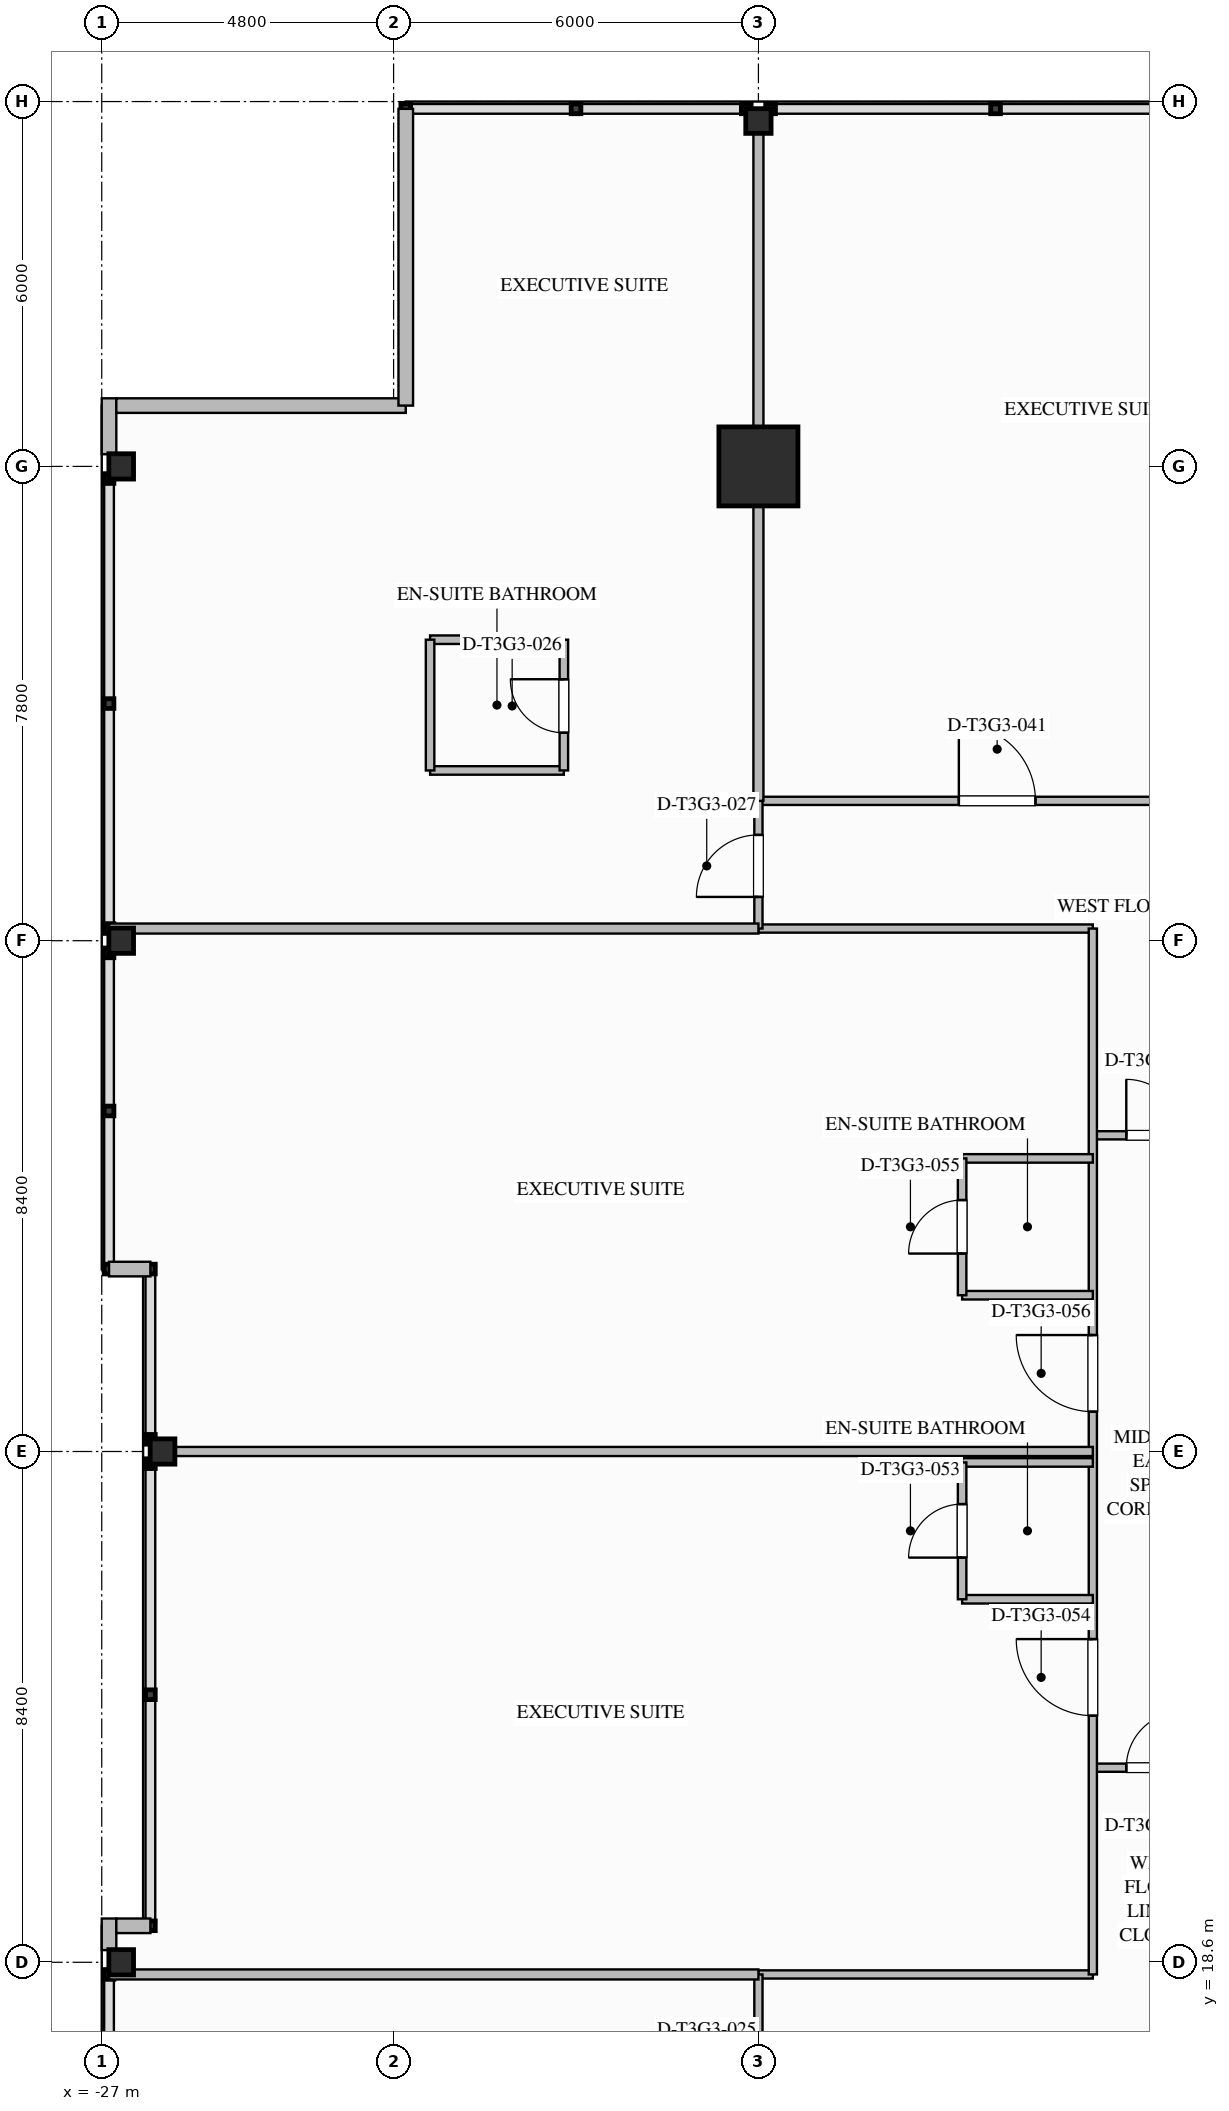
"""IFC4 building model, lengths in metres.
Left out: names, types, materials, properties, quantities, classifications, styles, units other than length and angle.
Written with IfcOpenShell. Run it as: python <this file> out.ifc"""

import sys

from ifc_helpers import new_model, si_unit, direction, frame, frame_2d, origin, origin_2d, place, context, subcontext, project, spatial, rectangle, i_section, extrude, element, fill, save


model = new_model("IFC4")
c1 = context("Model", 3, precision=1e-05, world=origin(), true_north=direction((0.0, 1.0)))
c2 = subcontext(c1, "Body", "Model", "MODEL_VIEW")
j1 = project(units=[si_unit("LENGTHUNIT", "METRE"), si_unit("PLANEANGLEUNIT", "RADIAN")], contexts=[c1])
p1 = place(None, origin())
s1 = spatial("IfcSite", under=j1, at=p1, CompositionType="ELEMENT")
p2 = place(p1, origin())
s2 = spatial("IfcBuilding", under=s1, at=p2, CompositionType="ELEMENT")
p3 = place(p2, frame((0.0, 0.0, 171.7)))
s3 = spatial("IfcBuildingStorey", under=s2, at=p3, CompositionType="ELEMENT", Elevation=171.7)
p4 = place(p3, frame((-16.2, 43.2, 0.0), z_axis=(0.0, 0.0, 1.0), x_axis=(1.0, 0.0, 0.0)))
e1 = element("IfcColumn", 1, at=p4, inside=s3, PredefinedType="COLUMN", context=c2, shape_type="SweptSolid", body=[
    extrude(rectangle(XDim=1.3, YDim=1.3, at=origin_2d()), origin(), (0.0, 0.0, 1.0), 3.55),
])
for number, where, z_axis, x_axis in (
    (2, (-26.68, 18.6, 0.0), (0.0, 0.0, 1.0), (1.0, 0.0, 0.0)),
    (3, (-26.0, 27.0, 0.0), (0.0, 0.0, 1.0), (1.0, 0.0, 0.0)),
    (4, (-26.68, 35.4, 0.0), (0.0, 0.0, 1.0), (1.0, 0.0, 0.0)),
    (5, (-26.68, 43.2, 0.0), (0.0, 0.0, 1.0), (1.0, 0.0, 0.0)),
    (6, (-16.2, 48.88, 0.0), (0.0, 0.0, 1.0), (0.0, 1.0, 0.0)),
):
    element("IfcColumn", number, at=place(p3, frame(where, z_axis=z_axis, x_axis=x_axis)), inside=s3, PredefinedType="COLUMN", context=c2, shape_type="SweptSolid", body=[
        extrude(i_section(OverallWidth=0.406, OverallDepth=0.416, WebThickness=0.03, FlangeThickness=0.048, FilletRadius=0.028, at=origin_2d()), origin(), (0.0, 0.0, 1.0), 3.547),
    ])
p5 = place(p3, frame((-26.88, 18.8, 0.0), z_axis=(0.0, 0.0, 1.0), x_axis=(0.0, 1.0, 0.0)))
e7 = element("IfcWall", 7, at=p5, inside=s3, PredefinedType="STANDARD", context=c2, shape_type="SweptSolid", body=[
    extrude(rectangle(XDim=0.52, YDim=0.24, at=frame_2d((0.26, 0.0))), origin(), (0.0, 0.0, 1.0), 3.29),
])
p6 = place(p3, frame((-26.88, 43.4, 0.0), z_axis=(0.0, 0.0, 1.0), x_axis=(0.0, 1.0, 0.0)))
e8 = element("IfcWall", 8, at=p6, inside=s3, PredefinedType="STANDARD", context=c2, shape_type="SweptSolid", body=[
    extrude(rectangle(XDim=0.92, YDim=0.24, at=frame_2d((0.46, 0.0))), origin(), (0.0, 0.0, 1.0), 3.29),
])
p7 = place(p3, frame((-26.76, 44.2, 0.0), z_axis=(0.0, 0.0, 1.0), x_axis=(1.0, 0.0, 0.0)))
e9 = element("IfcWall", 9, at=p7, inside=s3, PredefinedType="STANDARD", context=c2, shape_type="SweptSolid", body=[
    extrude(rectangle(XDim=4.76, YDim=0.24, at=frame_2d((2.38, 0.0))), origin(), (0.0, 0.0, 1.0), 3.29),
])
p8 = place(p3, frame((-22.0, 44.2, 0.0), z_axis=(0.0, 0.0, 1.0), x_axis=(0.0, 1.0, 0.0)))
e10 = element("IfcWall", 10, at=p8, inside=s3, PredefinedType="STANDARD", context=c2, shape_type="SweptSolid", body=[
    extrude(rectangle(XDim=4.88, YDim=0.24, at=frame_2d((2.44, 0.0))), origin(), (0.0, 0.0, 1.0), 3.29),
])
p9 = place(p3, frame((-26.76, 19.2, 0.0), z_axis=(0.0, 0.0, 1.0), x_axis=(1.0, 0.0, 0.0)))
e11 = element("IfcWall", 11, at=p9, inside=s3, PredefinedType="STANDARD", context=c2, shape_type="SweptSolid", body=[
    extrude(rectangle(XDim=0.56, YDim=0.24, at=frame_2d((0.28, 0.0))), origin(), (0.0, 0.0, 1.0), 3.29),
])
p10 = place(p3, frame((-26.2, 30.0, 0.0), z_axis=(0.0, 0.0, 1.0), x_axis=(-1.0, 0.0, 0.0)))
e12 = element("IfcWall", 12, at=p10, inside=s3, PredefinedType="STANDARD", context=c2, shape_type="SweptSolid", body=[
    extrude(rectangle(XDim=0.68, YDim=0.24, at=frame_2d((0.34, 0.0))), origin(), (0.0, 0.0, 1.0), 3.29),
])
p11 = place(p3, frame((-10.7, 21.8, 0.0), z_axis=(0.0, 0.0, 1.0), x_axis=(1.0, 0.0, 0.0)))
e13 = element("IfcWall", 13, at=p11, inside=s3, PredefinedType="PARTITIONING", context=c2, shape_type="SweptSolid", body=[
    extrude(rectangle(XDim=2.1, YDim=0.135, at=frame_2d((1.05, 0.0))), origin(), (0.0, 0.0, 1.0), 3.29),
])
p12 = place(p11, frame((0.55, 0.0, 0.0)))
e14 = element("IfcOpeningElement", 14, at=p12, cuts=e13, PredefinedType="OPENING", context=c2, shape_type="SweptSolid", body=[
    extrude(rectangle(XDim=0.92, YDim=2.1, at=frame_2d((0.46, 1.05))), frame((0.0, 0.077, 0.0), z_axis=(0.0, -1.0, 0.0), x_axis=(1.0, 0.0, 0.0)), (0.0, 0.0, 1.0), 0.155),
])
p13 = place(p3, frame((-10.7, 32.2, 0.0), z_axis=(0.0, 0.0, 1.0), x_axis=(1.0, 0.0, 0.0)))
e15 = element("IfcWall", 15, at=p13, inside=s3, PredefinedType="PARTITIONING", context=c2, shape_type="SweptSolid", body=[
    extrude(rectangle(XDim=2.1, YDim=0.135, at=frame_2d((1.05, 0.0))), origin(), (0.0, 0.0, 1.0), 3.29),
])
p14 = place(p13, frame((0.55, 0.0, 0.0)))
e16 = element("IfcOpeningElement", 16, at=p14, cuts=e15, PredefinedType="OPENING", context=c2, shape_type="SweptSolid", body=[
    extrude(rectangle(XDim=0.92, YDim=2.1, at=frame_2d((0.46, 1.05))), frame((0.0, 0.077, 0.0), z_axis=(0.0, -1.0, 0.0), x_axis=(1.0, 0.0, 0.0)), (0.0, 0.0, 1.0), 0.155),
])
for number, where, z_axis, x_axis in (
    (17, (-16.2, 18.4, 0.0), (0.0, 0.0, 1.0), (1.0, 0.0, 0.0)),
    (18, (-16.2, 35.6, 0.0), (0.0, 0.0, 1.0), (1.0, 0.0, 0.0)),
):
    element("IfcWall", number, at=place(p3, frame(where, z_axis=z_axis, x_axis=x_axis)), inside=s3, PredefinedType="PARTITIONING", context=c2, shape_type="SweptSolid", body=[
        extrude(rectangle(XDim=5.5, YDim=0.135, at=frame_2d((2.75, 0.0))), origin(), (0.0, 0.0, 1.0), 2.667),
    ])
p15 = place(p3, frame((-16.2, 37.7, 0.0), z_axis=(0.0, 0.0, 1.0), x_axis=(1.0, 0.0, 0.0)))
e19 = element("IfcWall", 19, at=p15, inside=s3, PredefinedType="PARTITIONING", context=c2, shape_type="SweptSolid", body=[
    extrude(rectangle(XDim=24.8, YDim=0.135, at=frame_2d((12.4, 0.0))), origin(), (0.0, 0.0, 1.0), 3.29),
])
p16 = place(p15, frame((3.296, 0.0, 0.0)))
e20 = element("IfcOpeningElement", 20, at=p16, cuts=e19, PredefinedType="OPENING", context=c2, shape_type="SweptSolid", body=[
    extrude(rectangle(XDim=1.26, YDim=2.2, at=frame_2d((0.63, 1.1))), frame((0.0, 0.077, 0.0), z_axis=(0.0, -1.0, 0.0), x_axis=(1.0, 0.0, 0.0)), (0.0, 0.0, 1.0), 0.155),
])
p17 = place(p15, frame((13.1, 0.0, 0.0)))
e21 = element("IfcOpeningElement", 21, at=p17, cuts=e19, PredefinedType="OPENING", context=c2, shape_type="SweptSolid", body=[
    extrude(rectangle(XDim=1.02, YDim=2.15, at=frame_2d((0.51, 1.075))), frame((0.0, 0.077, 0.0), z_axis=(0.0, -1.0, 0.0), x_axis=(1.0, 0.0, 0.0)), (0.0, 0.0, 1.0), 0.155),
])
p18 = place(p15, frame((19.023, 0.0, 0.0)))
e22 = element("IfcOpeningElement", 22, at=p18, cuts=e19, PredefinedType="OPENING", context=c2, shape_type="SweptSolid", body=[
    extrude(rectangle(XDim=1.26, YDim=2.2, at=frame_2d((0.63, 1.1))), frame((0.0, 0.077, 0.0), z_axis=(0.0, -1.0, 0.0), x_axis=(1.0, 0.0, 0.0)), (0.0, 0.0, 1.0), 0.155),
])
p19 = place(p3, frame((-10.7, 18.4, 0.0), z_axis=(0.0, 0.0, 1.0), x_axis=(0.0, 1.0, 0.0)))
e23 = element("IfcWall", 23, at=p19, inside=s3, PredefinedType="PARTITIONING", context=c2, shape_type="SweptSolid", body=[
    extrude(rectangle(XDim=17.2, YDim=0.135, at=frame_2d((8.6, 0.0))), origin(), (0.0, 0.0, 1.0), 3.29),
])
p20 = place(p19, frame((4.255, 0.0, 0.0)))
e24 = element("IfcOpeningElement", 24, at=p20, cuts=e23, PredefinedType="OPENING", context=c2, shape_type="SweptSolid", body=[
    extrude(rectangle(XDim=1.26, YDim=2.2, at=frame_2d((0.63, 1.1))), frame((0.0, 0.077, 0.0), z_axis=(0.0, -1.0, 0.0), x_axis=(1.0, 0.0, 0.0)), (0.0, 0.0, 1.0), 0.155),
])
p21 = place(p19, frame((9.255, 0.0, 0.0)))
e25 = element("IfcOpeningElement", 25, at=p21, cuts=e23, PredefinedType="OPENING", context=c2, shape_type="SweptSolid", body=[
    extrude(rectangle(XDim=1.26, YDim=2.2, at=frame_2d((0.63, 1.1))), frame((0.0, 0.077, 0.0), z_axis=(0.0, -1.0, 0.0), x_axis=(1.0, 0.0, 0.0)), (0.0, 0.0, 1.0), 0.155),
])
p22 = place(p3, frame((-16.2, 15.45, 0.0), z_axis=(0.0, 0.0, 1.0), x_axis=(0.0, 1.0, 0.0)))
e26 = element("IfcWall", 26, at=p22, inside=s3, PredefinedType="PARTITIONING", context=c2, shape_type="SweptSolid", body=[
    extrude(rectangle(XDim=2.95, YDim=0.135, at=frame_2d((1.475, 0.0))), origin(), (0.0, 0.0, 1.0), 2.58),
])
p23 = place(p22, frame((0.52, 0.0, 0.0)))
e27 = element("IfcOpeningElement", 27, at=p23, cuts=e26, PredefinedType="OPENING", context=c2, shape_type="SweptSolid", body=[
    extrude(rectangle(XDim=1.02, YDim=2.15, at=frame_2d((0.51, 1.075))), frame((0.0, 0.077, 0.0), z_axis=(0.0, -1.0, 0.0), x_axis=(1.0, 0.0, 0.0)), (0.0, 0.0, 1.0), 0.155),
])
p24 = place(p3, frame((-16.2, 35.6, 0.0), z_axis=(0.0, 0.0, 1.0), x_axis=(0.0, 1.0, 0.0)))
e28 = element("IfcWall", 28, at=p24, inside=s3, PredefinedType="PARTITIONING", context=c2, shape_type="SweptSolid", body=[
    extrude(rectangle(XDim=2.1, YDim=0.135, at=frame_2d((1.05, 0.0))), origin(), (0.0, 0.0, 1.0), 2.58),
])
p25 = place(p24, frame((0.52, 0.0, 0.0)))
e29 = element("IfcOpeningElement", 29, at=p25, cuts=e28, PredefinedType="OPENING", context=c2, shape_type="SweptSolid", body=[
    extrude(rectangle(XDim=1.02, YDim=2.15, at=frame_2d((0.51, 1.075))), frame((0.0, 0.077, 0.0), z_axis=(0.0, -1.0, 0.0), x_axis=(1.0, 0.0, 0.0)), (0.0, 0.0, 1.0), 0.155),
])
p26 = place(p3, frame((-16.2, 37.7, 0.0), z_axis=(0.0, 0.0, 1.0), x_axis=(0.0, 1.0, 0.0)))
e30 = element("IfcWall", 30, at=p26, inside=s3, PredefinedType="PARTITIONING", context=c2, shape_type="SweptSolid", body=[
    extrude(rectangle(XDim=11.38, YDim=0.165, at=frame_2d((5.69, 0.0))), origin(), (0.0, 0.0, 1.0), 2.58),
])
for number, where, z_axis, x_axis in (
    (31, (-26.88, 18.4, 0.0), (0.0, 0.0, 1.0), (1.0, 0.0, 0.0)),
    (32, (-26.88, 35.6, 0.0), (0.0, 0.0, 1.0), (1.0, 0.0, 0.0)),
):
    element("IfcWall", number, at=place(p3, frame(where, z_axis=z_axis, x_axis=x_axis)), inside=s3, PredefinedType="PARTITIONING", context=c2, shape_type="SweptSolid", body=[
        extrude(rectangle(XDim=10.68, YDim=0.165, at=frame_2d((5.34, 0.0))), origin(), (0.0, 0.0, 1.0), 2.58),
    ])
for number, where, z_axis, x_axis in (
    (33, (-21.6, 38.2, 0.0), (0.0, 0.0, 1.0), (1.0, 0.0, 0.0)),
    (34, (-21.6, 40.35, 0.0), (0.0, 0.0, 1.0), (1.0, 0.0, 0.0)),
):
    element("IfcWall", number, at=place(p3, frame(where, z_axis=z_axis, x_axis=x_axis)), inside=s3, PredefinedType="PLUMBINGWALL", context=c2, shape_type="SweptSolid", body=[
        extrude(rectangle(XDim=2.2, YDim=0.14, at=frame_2d((1.1, 0.0))), origin(), (0.0, 0.0, 1.0), 3.29),
    ])
p27 = place(p3, frame((-21.6, 38.2, 0.0), z_axis=(0.0, 0.0, 1.0), x_axis=(0.0, 1.0, 0.0)))
e35 = element("IfcWall", 35, at=p27, inside=s3, PredefinedType="PLUMBINGWALL", context=c2, shape_type="SweptSolid", body=[
    extrude(rectangle(XDim=2.15, YDim=0.14, at=frame_2d((1.075, 0.0))), origin(), (0.0, 0.0, 1.0), 3.29),
])
p28 = place(p3, frame((-19.4, 38.2, 0.0), z_axis=(0.0, 0.0, 1.0), x_axis=(0.0, 1.0, 0.0)))
e36 = element("IfcWall", 36, at=p28, inside=s3, PredefinedType="PLUMBINGWALL", context=c2, shape_type="SweptSolid", body=[
    extrude(rectangle(XDim=2.15, YDim=0.14, at=frame_2d((1.075, 0.0))), origin(), (0.0, 0.0, 1.0), 3.29),
])
p29 = place(p28, frame((0.62, 0.0, 0.0)))
e37 = element("IfcOpeningElement", 37, at=p29, cuts=e36, PredefinedType="OPENING", context=c2, shape_type="SweptSolid", body=[
    extrude(rectangle(XDim=0.88, YDim=2.1, at=frame_2d((0.44, 1.05))), frame((0.0, 0.08, 0.0), z_axis=(0.0, -1.0, 0.0), x_axis=(1.0, 0.0, 0.0)), (0.0, 0.0, 1.0), 0.16),
])
p30 = place(p3, frame((-26.2, 27.0, 0.0), z_axis=(0.0, 0.0, 1.0), x_axis=(1.0, 0.0, 0.0)))
e38 = element("IfcWall", 38, at=p30, inside=s3, PredefinedType="PARTITIONING", context=c2, shape_type="SweptSolid", body=[
    extrude(rectangle(XDim=15.5, YDim=0.15, at=frame_2d((7.75, 0.0))), origin(), (0.0, 0.0, 1.0), 2.58),
])
p31 = place(p3, frame((-10.7, 24.57, 0.0), z_axis=(0.0, 0.0, 1.0), x_axis=(-1.0, 0.0, 0.0)))
e39 = element("IfcWall", 39, at=p31, inside=s3, PredefinedType="PLUMBINGWALL", context=c2, shape_type="SweptSolid", body=[
    extrude(rectangle(XDim=2.15, YDim=0.14, at=frame_2d((1.075, 0.0))), origin(), (0.0, 0.0, 1.0), 3.29),
])
p32 = place(p3, frame((-10.7, 26.82, 0.0), z_axis=(0.0, 0.0, 1.0), x_axis=(-1.0, 0.0, 0.0)))
e40 = element("IfcWall", 40, at=p32, inside=s3, PredefinedType="PLUMBINGWALL", context=c2, shape_type="SweptSolid", body=[
    extrude(rectangle(XDim=2.15, YDim=0.14, at=frame_2d((1.075, 0.0))), origin(), (0.0, 0.0, 1.0), 2.667),
])
p33 = place(p3, frame((-12.85, 24.57, 0.0), z_axis=(0.0, 0.0, 1.0), x_axis=(0.0, 1.0, 0.0)))
e41 = element("IfcWall", 41, at=p33, inside=s3, PredefinedType="PLUMBINGWALL", context=c2, shape_type="SweptSolid", body=[
    extrude(rectangle(XDim=2.25, YDim=0.14, at=frame_2d((1.125, 0.0))), origin(), (0.0, 0.0, 1.0), 3.29),
])
p34 = place(p33, frame((0.685, 0.0, 0.0)))
e42 = element("IfcOpeningElement", 42, at=p34, cuts=e41, PredefinedType="OPENING", context=c2, shape_type="SweptSolid", body=[
    extrude(rectangle(XDim=0.88, YDim=2.1, at=frame_2d((0.44, 1.05))), frame((0.0, 0.08, 0.0), z_axis=(0.0, -1.0, 0.0), x_axis=(1.0, 0.0, 0.0)), (0.0, 0.0, 1.0), 0.16),
])
for number, where, z_axis, x_axis in (
    (43, (-10.7, 29.57, 0.0), (0.0, 0.0, 1.0), (-1.0, 0.0, 0.0)),
    (44, (-10.7, 31.82, 0.0), (0.0, 0.0, 1.0), (-1.0, 0.0, 0.0)),
):
    element("IfcWall", number, at=place(p3, frame(where, z_axis=z_axis, x_axis=x_axis)), inside=s3, PredefinedType="PLUMBINGWALL", context=c2, shape_type="SweptSolid", body=[
        extrude(rectangle(XDim=2.15, YDim=0.14, at=frame_2d((1.075, 0.0))), origin(), (0.0, 0.0, 1.0), 3.29),
    ])
p35 = place(p3, frame((-12.85, 29.57, 0.0), z_axis=(0.0, 0.0, 1.0), x_axis=(0.0, 1.0, 0.0)))
e45 = element("IfcWall", 45, at=p35, inside=s3, PredefinedType="PLUMBINGWALL", context=c2, shape_type="SweptSolid", body=[
    extrude(rectangle(XDim=2.25, YDim=0.14, at=frame_2d((1.125, 0.0))), origin(), (0.0, 0.0, 1.0), 3.29),
])
p36 = place(p35, frame((0.685, 0.0, 0.0)))
e46 = element("IfcOpeningElement", 46, at=p36, cuts=e45, PredefinedType="OPENING", context=c2, shape_type="SweptSolid", body=[
    extrude(rectangle(XDim=0.88, YDim=2.1, at=frame_2d((0.44, 1.05))), frame((0.0, 0.08, 0.0), z_axis=(0.0, -1.0, 0.0), x_axis=(1.0, 0.0, 0.0)), (0.0, 0.0, 1.0), 0.16),
])
p37 = place(p12, origin())
e47 = element("IfcDoor", 47, at=p37, inside=s3, OperationType="SINGLE_SWING_RIGHT", PredefinedType="DOOR", context=c2, shape_type="SweptSolid", body=[
    extrude(rectangle(XDim=0.92, YDim=2.1, at=frame_2d((0.46, 1.05))), frame((0.0, 0.025, 0.0), z_axis=(0.0, -1.0, 0.0), x_axis=(1.0, 0.0, 0.0)), (0.0, 0.0, 1.0), 0.05),
])
fill(e14, e47)
p38 = place(p14, origin())
e48 = element("IfcDoor", 48, at=p38, inside=s3, OperationType="SINGLE_SWING_LEFT", PredefinedType="DOOR", context=c2, shape_type="SweptSolid", body=[
    extrude(rectangle(XDim=0.92, YDim=2.1, at=frame_2d((0.46, 1.05))), frame((0.0, 0.025, 0.0), z_axis=(0.0, -1.0, 0.0), x_axis=(1.0, 0.0, 0.0)), (0.0, 0.0, 1.0), 0.05),
])
fill(e16, e48)
p39 = place(p29, origin())
e49 = element("IfcDoor", 49, at=p39, inside=s3, OperationType="SINGLE_SWING_RIGHT", PredefinedType="DOOR", context=c2, shape_type="SweptSolid", body=[
    extrude(rectangle(XDim=0.88, YDim=2.1, at=frame_2d((0.44, 1.05))), frame((0.0, 0.025, 0.0), z_axis=(0.0, -1.0, 0.0), x_axis=(1.0, 0.0, 0.0)), (0.0, 0.0, 1.0), 0.05),
])
fill(e37, e49)
p40 = place(p25, origin())
e50 = element("IfcDoor", 50, at=p40, inside=s3, OperationType="SINGLE_SWING_LEFT", PredefinedType="DOOR", context=c2, shape_type="SweptSolid", body=[
    extrude(rectangle(XDim=1.02, YDim=2.15, at=frame_2d((0.51, 1.075))), frame((0.0, 0.025, 0.0), z_axis=(0.0, -1.0, 0.0), x_axis=(1.0, 0.0, 0.0)), (0.0, 0.0, 1.0), 0.05),
])
fill(e29, e50)
p41 = place(p16, origin())
e51 = element("IfcDoor", 51, at=p41, inside=s3, OperationType="SINGLE_SWING_LEFT", PredefinedType="DOOR", context=c2, shape_type="SweptSolid", body=[
    extrude(rectangle(XDim=1.26, YDim=2.2, at=frame_2d((0.63, 1.1))), frame((0.0, 0.025, 0.0), z_axis=(0.0, -1.0, 0.0), x_axis=(1.0, 0.0, 0.0)), (0.0, 0.0, 1.0), 0.05),
])
fill(e20, e51)
p42 = place(p34, origin())
e52 = element("IfcDoor", 52, at=p42, inside=s3, OperationType="SINGLE_SWING_LEFT", PredefinedType="DOOR", context=c2, shape_type="SweptSolid", body=[
    extrude(rectangle(XDim=0.88, YDim=2.1, at=frame_2d((0.44, 1.05))), frame((0.0, 0.025, 0.0), z_axis=(0.0, -1.0, 0.0), x_axis=(1.0, 0.0, 0.0)), (0.0, 0.0, 1.0), 0.05),
])
fill(e42, e52)
p43 = place(p20, origin())
e53 = element("IfcDoor", 53, at=p43, inside=s3, OperationType="SINGLE_SWING_RIGHT", PredefinedType="DOOR", context=c2, shape_type="SweptSolid", body=[
    extrude(rectangle(XDim=1.26, YDim=2.2, at=frame_2d((0.63, 1.1))), frame((0.0, 0.025, 0.0), z_axis=(0.0, -1.0, 0.0), x_axis=(1.0, 0.0, 0.0)), (0.0, 0.0, 1.0), 0.05),
])
fill(e24, e53)
p44 = place(p36, origin())
e54 = element("IfcDoor", 54, at=p44, inside=s3, OperationType="SINGLE_SWING_LEFT", PredefinedType="DOOR", context=c2, shape_type="SweptSolid", body=[
    extrude(rectangle(XDim=0.88, YDim=2.1, at=frame_2d((0.44, 1.05))), frame((0.0, 0.025, 0.0), z_axis=(0.0, -1.0, 0.0), x_axis=(1.0, 0.0, 0.0)), (0.0, 0.0, 1.0), 0.05),
])
fill(e46, e54)
p45 = place(p21, origin())
e55 = element("IfcDoor", 55, at=p45, inside=s3, OperationType="SINGLE_SWING_RIGHT", PredefinedType="DOOR", context=c2, shape_type="SweptSolid", body=[
    extrude(rectangle(XDim=1.26, YDim=2.2, at=frame_2d((0.63, 1.1))), frame((0.0, 0.025, 0.0), z_axis=(0.0, -1.0, 0.0), x_axis=(1.0, 0.0, 0.0)), (0.0, 0.0, 1.0), 0.05),
])
fill(e25, e55)
save(model, sys.argv[1])
